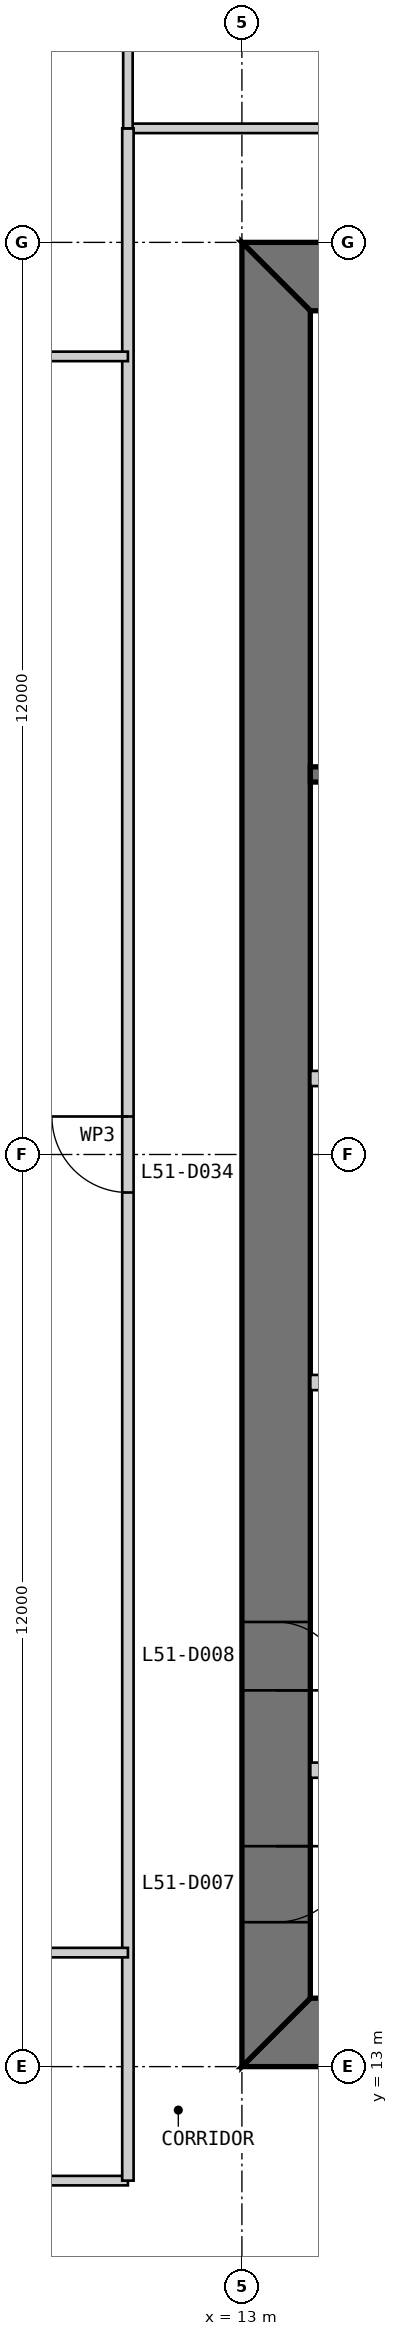
"""IFC4 building model, lengths in metres.
Left out: names, types, materials, properties, quantities, classifications, styles, units other than length and angle.
Written with IfcOpenShell. Run it as: python <this file> out.ifc"""

import sys

from ifc_helpers import new_model, si_unit, direction, frame, frame_2d, origin, place, context, subcontext, project, spatial, polyline, rectangle, outline, extrude, element, fill, save


model = new_model("IFC4")
c1 = context("Model", 3, precision=1e-05, world=origin(), true_north=direction((0.0, 1.0)))
c2 = subcontext(c1, "Body", "Model", "MODEL_VIEW")
j1 = project(units=[si_unit("LENGTHUNIT", "METRE"), si_unit("PLANEANGLEUNIT", "RADIAN")], contexts=[c1])
p1 = place(None, origin())
s1 = spatial("IfcSite", under=j1, at=p1, CompositionType="ELEMENT")
p2 = place(p1, origin())
s2 = spatial("IfcBuilding", under=s1, at=p2, CompositionType="ELEMENT")
p3 = place(p2, frame((0.0, 0.0, 217.8)))
s3 = spatial("IfcBuildingStorey", under=s2, at=p3, CompositionType="ELEMENT", Elevation=217.8)
p4 = place(p3, frame((13.0, 13.45, 0.0), z_axis=(0.0, 0.0, 1.0), x_axis=(1.0, 0.0, 0.0)))
e1 = element("IfcWall", 1, at=p4, inside=s3, PredefinedType="SHEAR", context=c2, shape_type="SweptSolid", body=[
    extrude(outline(polyline([(0.0, -0.45), (24.0, -0.45), (23.1, 0.45), (0.9, 0.45), (0.0, -0.45)])), origin(), (0.0, 0.0, 1.0), 4.0),
])
p5 = place(p4, frame((4.9, 0.0, 0.0)))
e2 = element("IfcOpeningElement", 2, at=p5, cuts=e1, PredefinedType="OPENING", context=c2, shape_type="SweptSolid", body=[
    extrude(rectangle(XDim=1.0, YDim=2.2, at=frame_2d((0.5, 1.1))), frame((0.0, 0.46, 0.0), z_axis=(0.0, -1.0, 0.0), x_axis=(1.0, 0.0, 0.0)), (0.0, 0.0, 1.0), 0.92),
])
p6 = place(p4, frame((8.9, 0.0, 0.0)))
e3 = element("IfcOpeningElement", 3, at=p6, cuts=e1, PredefinedType="OPENING", context=c2, shape_type="SweptSolid", body=[
    extrude(rectangle(XDim=1.1, YDim=2.2, at=frame_2d((0.55, 1.1))), frame((0.0, 0.46, 0.0), z_axis=(0.0, -1.0, 0.0), x_axis=(1.0, 0.0, 0.0)), (0.0, 0.0, 1.0), 0.92),
])
p7 = place(p4, frame((15.05, 0.0, 0.0)))
e4 = element("IfcOpeningElement", 4, at=p7, cuts=e1, PredefinedType="OPENING", context=c2, shape_type="SweptSolid", body=[
    extrude(rectangle(XDim=0.9, YDim=2.2, at=frame_2d((0.45, 1.1))), frame((0.0, 0.46, 0.0), z_axis=(0.0, -1.0, 0.0), x_axis=(1.0, 0.0, 0.0)), (0.0, 0.0, 1.0), 0.92),
])
p8 = place(p4, frame((17.9, 0.0, 0.0)))
e5 = element("IfcOpeningElement", 5, at=p8, cuts=e1, PredefinedType="OPENING", context=c2, shape_type="SweptSolid", body=[
    extrude(rectangle(XDim=1.0, YDim=2.2, at=frame_2d((0.5, 1.1))), frame((0.0, 0.46, 0.0), z_axis=(0.0, -1.0, 0.0), x_axis=(1.0, 0.0, 0.0)), (0.0, 0.0, 1.0), 0.92),
])
p9 = place(p4, frame((21.4, 0.0, 0.0)))
e6 = element("IfcOpeningElement", 6, at=p9, cuts=e1, PredefinedType="OPENING", context=c2, shape_type="SweptSolid", body=[
    extrude(rectangle(XDim=1.0, YDim=2.2, at=frame_2d((0.5, 1.1))), frame((0.0, 0.46, 0.0), z_axis=(0.0, -1.0, 0.0), x_axis=(1.0, 0.0, 0.0)), (0.0, 0.0, 1.0), 0.92),
])
p10 = place(p3, frame((37.0, 36.55, 0.0), z_axis=(0.0, 0.0, 1.0), x_axis=(-1.0, 0.0, 0.0)))
e7 = element("IfcWall", 7, at=p10, inside=s3, PredefinedType="SHEAR", context=c2, shape_type="SweptSolid", body=[
    extrude(outline(polyline([(0.0, -0.45), (24.0, -0.45), (23.1, 0.45), (0.9, 0.45), (0.0, -0.45)])), origin(), (0.0, 0.0, 1.0), 4.0),
])
p11 = place(p10, frame((4.9, 0.0, 0.0)))
e8 = element("IfcOpeningElement", 8, at=p11, cuts=e7, PredefinedType="OPENING", context=c2, shape_type="SweptSolid", body=[
    extrude(rectangle(XDim=1.0, YDim=2.2, at=frame_2d((0.5, 1.1))), frame((0.0, 0.46, 0.0), z_axis=(0.0, -1.0, 0.0), x_axis=(1.0, 0.0, 0.0)), (0.0, 0.0, 1.0), 0.92),
])
p12 = place(p10, frame((8.9, 0.0, 0.0)))
e9 = element("IfcOpeningElement", 9, at=p12, cuts=e7, PredefinedType="OPENING", context=c2, shape_type="SweptSolid", body=[
    extrude(rectangle(XDim=1.1, YDim=2.2, at=frame_2d((0.55, 1.1))), frame((0.0, 0.46, 0.0), z_axis=(0.0, -1.0, 0.0), x_axis=(1.0, 0.0, 0.0)), (0.0, 0.0, 1.0), 0.92),
])
p13 = place(p10, frame((15.05, 0.0, 0.0)))
e10 = element("IfcOpeningElement", 10, at=p13, cuts=e7, PredefinedType="OPENING", context=c2, shape_type="SweptSolid", body=[
    extrude(rectangle(XDim=0.9, YDim=2.2, at=frame_2d((0.45, 1.1))), frame((0.0, 0.46, 0.0), z_axis=(0.0, -1.0, 0.0), x_axis=(1.0, 0.0, 0.0)), (0.0, 0.0, 1.0), 0.92),
])
p14 = place(p10, frame((17.9, 0.0, 0.0)))
e11 = element("IfcOpeningElement", 11, at=p14, cuts=e7, PredefinedType="OPENING", context=c2, shape_type="SweptSolid", body=[
    extrude(rectangle(XDim=1.0, YDim=2.2, at=frame_2d((0.5, 1.1))), frame((0.0, 0.46, 0.0), z_axis=(0.0, -1.0, 0.0), x_axis=(1.0, 0.0, 0.0)), (0.0, 0.0, 1.0), 0.92),
])
p15 = place(p10, frame((21.4, 0.0, 0.0)))
e12 = element("IfcOpeningElement", 12, at=p15, cuts=e7, PredefinedType="OPENING", context=c2, shape_type="SweptSolid", body=[
    extrude(rectangle(XDim=1.0, YDim=2.2, at=frame_2d((0.5, 1.1))), frame((0.0, 0.46, 0.0), z_axis=(0.0, -1.0, 0.0), x_axis=(1.0, 0.0, 0.0)), (0.0, 0.0, 1.0), 0.92),
])
p16 = place(p3, frame((13.45, 36.1, 0.0), z_axis=(0.0, 0.0, 1.0), x_axis=(0.0, -1.0, 0.0)))
e13 = element("IfcWall", 13, at=p16, inside=s3, PredefinedType="SHEAR", context=c2, shape_type="SweptSolid", body=[
    extrude(outline(polyline([(-0.9, -0.45), (23.1, -0.45), (22.2, 0.45), (0.0, 0.45), (-0.9, -0.45)])), origin(), (0.0, 0.0, 1.0), 4.0),
])
p17 = place(p16, frame((20.2, 0.0, 0.0)))
e14 = element("IfcOpeningElement", 14, at=p17, cuts=e13, PredefinedType="OPENING", context=c2, shape_type="SweptSolid", body=[
    extrude(rectangle(XDim=1.0, YDim=2.2, at=frame_2d((0.5, 1.1))), frame((0.0, 0.46, 0.0), z_axis=(0.0, -1.0, 0.0), x_axis=(1.0, 0.0, 0.0)), (0.0, 0.0, 1.0), 0.92),
])
p18 = place(p16, frame((17.25, 0.0, 0.0)))
e15 = element("IfcOpeningElement", 15, at=p18, cuts=e13, PredefinedType="OPENING", context=c2, shape_type="SweptSolid", body=[
    extrude(rectangle(XDim=0.9, YDim=2.2, at=frame_2d((0.45, 1.1))), frame((0.0, 0.46, 0.0), z_axis=(0.0, -1.0, 0.0), x_axis=(1.0, 0.0, 0.0)), (0.0, 0.0, 1.0), 0.92),
])
for number, where, z_axis, x_axis in (
    (16, (13.9, 16.9, 0.0), (0.0, 0.0, 1.0), (1.0, 0.0, 0.0)),
    (17, (13.9, 22.0, 0.0), (0.0, 0.0, 1.0), (1.0, 0.0, 0.0)),
    (18, (13.9, 26.0, 0.0), (0.0, 0.0, 1.0), (1.0, 0.0, 0.0)),
):
    element("IfcWall", number, at=place(p3, frame(where, z_axis=z_axis, x_axis=x_axis)), inside=s3, PredefinedType="PARTITIONING", context=c2, shape_type="SweptSolid", body=[
        extrude(rectangle(XDim=2.8, YDim=0.2, at=frame_2d((1.4, 0.0))), origin(), (0.0, 0.0, 1.0), 3.8),
    ])
p19 = place(p3, frame((29.7, 30.0, 0.0), z_axis=(0.0, 0.0, 1.0), x_axis=(-1.0, 0.0, 0.0)))
e19 = element("IfcWall", 19, at=p19, inside=s3, PredefinedType="SOLIDWALL", context=c2, shape_type="SweptSolid", body=[
    extrude(rectangle(XDim=15.8, YDim=0.2, at=frame_2d((7.9, 0.0))), origin(), (0.0, 0.0, 1.0), 3.8),
])
p20 = place(p3, frame((0.15, 11.5, 0.0), z_axis=(0.0, 0.0, 1.0), x_axis=(1.0, 0.0, 0.0)))
e20 = element("IfcWall", 20, at=p20, inside=s3, PredefinedType="PARTITIONING", context=c2, shape_type="SweptSolid", body=[
    extrude(rectangle(XDim=11.35, YDim=0.125, at=frame_2d((5.675, 0.0))), origin(), (0.0, 0.0, 1.0), 3.85),
])
p21 = place(p3, frame((14.5, 38.5, 0.0), z_axis=(0.0, 0.0, 1.0), x_axis=(-1.0, 0.0, 0.0)))
e21 = element("IfcWall", 21, at=p21, inside=s3, PredefinedType="PARTITIONING", context=c2, shape_type="SweptSolid", body=[
    extrude(rectangle(XDim=3.0, YDim=0.125, at=frame_2d((1.5, 0.0))), origin(), (0.0, 0.0, 1.0), 3.85),
])
p22 = place(p3, frame((11.5, 38.5, 0.0), z_axis=(0.0, 0.0, 1.0), x_axis=(0.0, -1.0, 0.0)))
e22 = element("IfcWall", 22, at=p22, inside=s3, PredefinedType="PARTITIONING", context=c2, shape_type="SweptSolid", body=[
    extrude(rectangle(XDim=27.0, YDim=0.15, at=frame_2d((13.5, 0.0))), origin(), (0.0, 0.0, 1.0), 3.85),
])
p23 = place(p22, frame((13.0, 0.0, 0.0)))
e23 = element("IfcOpeningElement", 23, at=p23, cuts=e22, PredefinedType="OPENING", context=c2, shape_type="SweptSolid", body=[
    extrude(rectangle(XDim=1.0, YDim=2.2, at=frame_2d((0.5, 1.1))), frame((0.0, 0.085, 0.0), z_axis=(0.0, -1.0, 0.0), x_axis=(1.0, 0.0, 0.0)), (0.0, 0.0, 1.0), 0.17),
])
p24 = place(p3, frame((11.5, 49.85, 0.0), z_axis=(0.0, 0.0, 1.0), x_axis=(0.0, -1.0, 0.0)))
e24 = element("IfcWall", 24, at=p24, inside=s3, PredefinedType="PARTITIONING", context=c2, shape_type="SweptSolid", body=[
    extrude(rectangle(XDim=11.35, YDim=0.125, at=frame_2d((5.675, 0.0))), origin(), (0.0, 0.0, 1.0), 3.85),
])
p25 = place(p3, frame((0.15, 35.5, 0.0), z_axis=(0.0, 0.0, 1.0), x_axis=(1.0, 0.0, 0.0)))
e25 = element("IfcWall", 25, at=p25, inside=s3, PredefinedType="PARTITIONING", context=c2, shape_type="SweptSolid", body=[
    extrude(rectangle(XDim=11.35, YDim=0.125, at=frame_2d((5.675, 0.0))), origin(), (0.0, 0.0, 1.0), 3.85),
])
p26 = place(p25, frame((7.9, 0.0, 0.0)))
e26 = element("IfcOpeningElement", 26, at=p26, cuts=e25, PredefinedType="OPENING", context=c2, shape_type="SweptSolid", body=[
    extrude(rectangle(XDim=0.9, YDim=2.2, at=frame_2d((0.45, 1.1))), frame((0.0, 0.073, 0.0), z_axis=(0.0, -1.0, 0.0), x_axis=(1.0, 0.0, 0.0)), (0.0, 0.0, 1.0), 0.145),
])
p27 = place(p3, frame((5.5, 14.5, 0.0), z_axis=(0.0, 0.0, 1.0), x_axis=(1.0, 0.0, 0.0)))
e27 = element("IfcWall", 27, at=p27, inside=s3, PredefinedType="PARTITIONING", context=c2, shape_type="SweptSolid", body=[
    extrude(rectangle(XDim=6.0, YDim=0.125, at=frame_2d((3.0, 0.0))), origin(), (0.0, 0.0, 1.0), 3.85),
])
p28 = place(p27, frame((2.55, 0.0, 0.0)))
e28 = element("IfcOpeningElement", 28, at=p28, cuts=e27, PredefinedType="OPENING", context=c2, shape_type="SweptSolid", body=[
    extrude(rectangle(XDim=0.9, YDim=2.2, at=frame_2d((0.45, 1.1))), frame((0.0, 0.073, 0.0), z_axis=(0.0, -1.0, 0.0), x_axis=(1.0, 0.0, 0.0)), (0.0, 0.0, 1.0), 0.145),
])
p29 = place(p17, origin())
e29 = element("IfcDoor", 29, at=p29, inside=s3, OperationType="SINGLE_SWING_LEFT", PredefinedType="DOOR", context=c2, shape_type="SweptSolid", body=[
    extrude(rectangle(XDim=1.0, YDim=2.2, at=frame_2d((0.5, 1.1))), frame((0.0, 0.025, 0.0), z_axis=(0.0, -1.0, 0.0), x_axis=(1.0, 0.0, 0.0)), (0.0, 0.0, 1.0), 0.05),
    extrude(outline(polyline([(0.0, 0.0), (0.04, 0.0), (0.04, 2.16), (0.96, 2.16), (0.96, 0.0), (1.0, 0.0), (1.0, 2.2), (0.0, 2.2), (0.0, 0.0)])), frame((0.0, 0.3, 0.0), z_axis=(0.0, -1.0, 0.0), x_axis=(1.0, 0.0, 0.0)), (0.0, 0.0, 1.0), 0.6),
])
fill(e14, e29)
p30 = place(p18, origin())
e30 = element("IfcDoor", 30, at=p30, inside=s3, OperationType="SINGLE_SWING_RIGHT", PredefinedType="DOOR", context=c2, shape_type="SweptSolid", body=[
    extrude(rectangle(XDim=0.9, YDim=2.2, at=frame_2d((0.45, 1.1))), frame((0.0, 0.025, 0.0), z_axis=(0.0, -1.0, 0.0), x_axis=(1.0, 0.0, 0.0)), (0.0, 0.0, 1.0), 0.05),
    extrude(outline(polyline([(0.0, 0.0), (0.04, 0.0), (0.04, 2.16), (0.86, 2.16), (0.86, 0.0), (0.9, 0.0), (0.9, 2.2), (0.0, 2.2), (0.0, 0.0)])), frame((0.0, 0.3, 0.0), z_axis=(0.0, -1.0, 0.0), x_axis=(1.0, 0.0, 0.0)), (0.0, 0.0, 1.0), 0.6),
])
fill(e15, e30)
p31 = place(p23, frame((1.0, 0.0, 0.0), z_axis=(0.0, 0.0, 1.0), x_axis=(-1.0, 0.0, 0.0)))
e31 = element("IfcDoor", 31, at=p31, inside=s3, OperationType="SINGLE_SWING_RIGHT", PredefinedType="DOOR", context=c2, shape_type="SweptSolid", body=[
    extrude(rectangle(XDim=1.0, YDim=2.2, at=frame_2d((0.5, 1.1))), frame((0.0, 0.025, 0.0), z_axis=(0.0, -1.0, 0.0), x_axis=(1.0, 0.0, 0.0)), (0.0, 0.0, 1.0), 0.05),
])
fill(e23, e31)
save(model, sys.argv[1])
